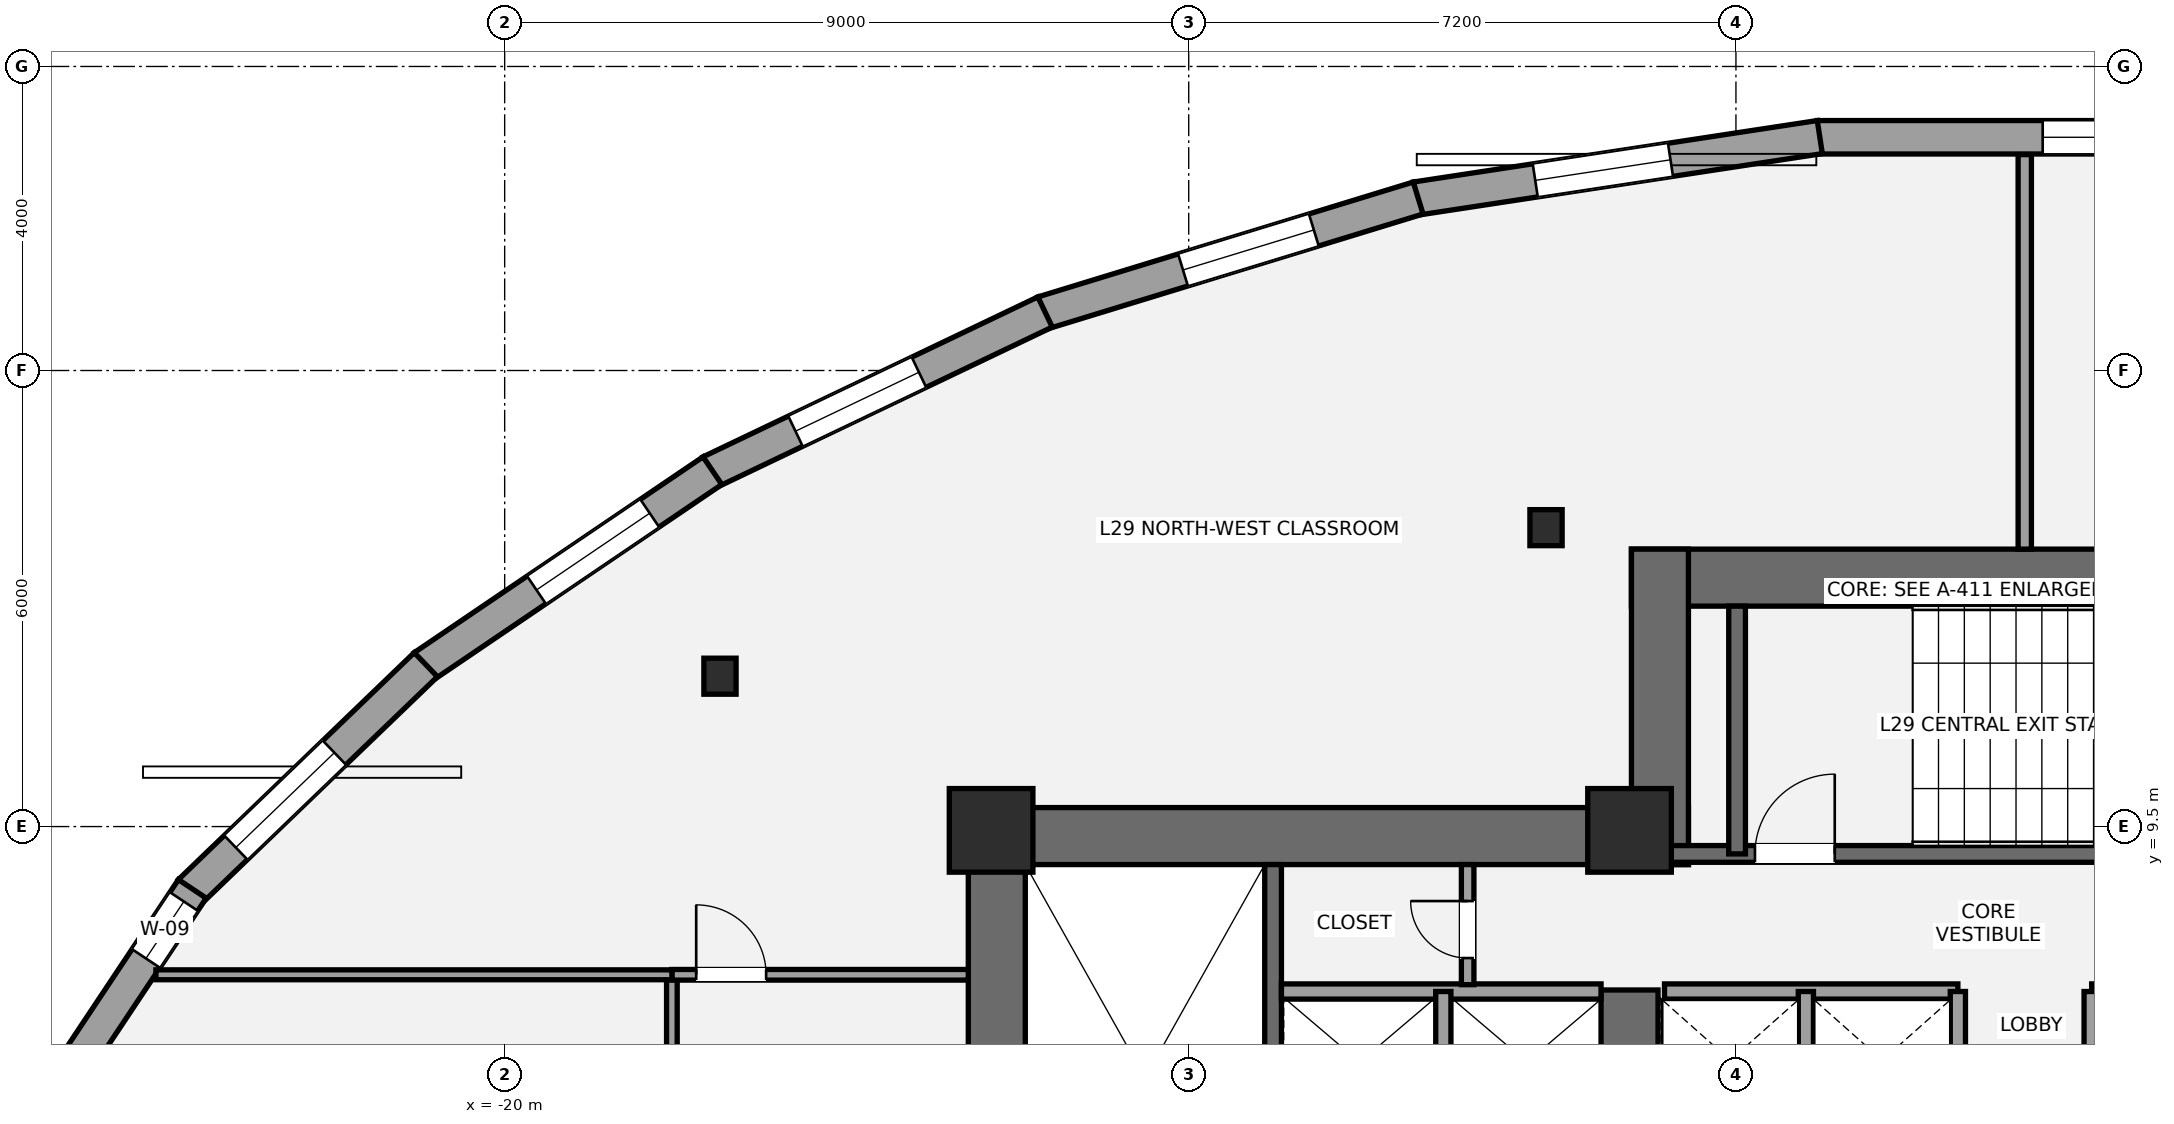
"""IFC4 building model, lengths in metres.
Left out: names, types, materials, properties, quantities, classifications, styles, units other than length and angle.
Written with IfcOpenShell. Run it as: python <this file> out.ifc"""

import sys

from ifc_helpers import new_model, si_unit, direction, frame, frame_2d, origin, origin_2d, place, context, subcontext, project, spatial, rectangle, i_section, extrude, element, fill, save


model = new_model("IFC4")
c1 = context("Model", 3, precision=1e-05, world=origin(), true_north=direction((0.0, 1.0)))
c2 = subcontext(c1, "Body", "Model", "MODEL_VIEW")
j1 = project(units=[si_unit("LENGTHUNIT", "METRE"), si_unit("PLANEANGLEUNIT", "RADIAN")], contexts=[c1])
p1 = place(None, origin())
s1 = spatial("IfcSite", under=j1, at=p1, CompositionType="ELEMENT")
p2 = place(p1, origin())
s2 = spatial("IfcBuilding", under=s1, at=p2, CompositionType="ELEMENT")
p3 = place(p2, frame((0.0, 0.0, 110.6)))
s3 = spatial("IfcBuildingStorey", under=s2, at=p3, CompositionType="ELEMENT", Elevation=110.6)
p4 = place(p3, frame((-13.525, 1.1, 0.0), z_axis=(0.0, 0.0, 1.0), x_axis=(0.0, 1.0, 0.0)))
e1 = element("IfcWall", 1, at=p4, inside=s3, PredefinedType="SHEAR", context=c2, shape_type="SweptSolid", body=[
    extrude(rectangle(XDim=8.65, YDim=0.75, at=frame_2d((4.325, 0.0))), origin(), (0.0, 0.0, 1.0), 3.5),
])
p5 = place(p3, frame((-13.9, 9.375, 0.0), z_axis=(0.0, 0.0, 1.0), x_axis=(1.0, 0.0, 0.0)))
e2 = element("IfcWall", 2, at=p5, inside=s3, PredefinedType="SHEAR", context=c2, shape_type="SweptSolid", body=[
    extrude(rectangle(XDim=9.475, YDim=0.75, at=frame_2d((4.737, 0.0))), origin(), (0.0, 0.0, 1.0), 3.5),
])
p6 = place(p3, frame((-5.2, 5.35, 0.0), z_axis=(0.0, 0.0, 1.0), x_axis=(0.0, 1.0, 0.0)))
e3 = element("IfcWall", 3, at=p6, inside=s3, PredefinedType="SHEAR", context=c2, shape_type="SweptSolid", body=[
    extrude(rectangle(XDim=2.0, YDim=0.75, at=frame_2d((1.0, 0.0))), origin(), (0.0, 0.0, 1.0), 3.5),
])
p7 = place(p3, frame((-9.89, 1.85, 0.0), z_axis=(0.0, 0.0, 1.0), x_axis=(0.0, 1.0, 0.0)))
e4 = element("IfcWall", 4, at=p7, inside=s3, PredefinedType="SHEAR", context=c2, shape_type="SweptSolid", body=[
    extrude(rectangle(XDim=7.15, YDim=0.22, at=frame_2d((3.575, 0.0))), origin(), (0.0, 0.0, 1.0), 3.5),
])
p8 = place(p3, frame((-5.175, 12.775, 0.0), z_axis=(0.0, 0.0, 1.0), x_axis=(1.0, 0.0, 0.0)))
e5 = element("IfcWall", 5, at=p8, inside=s3, PredefinedType="SHEAR", context=c2, shape_type="SweptSolid", body=[
    extrude(rectangle(XDim=10.35, YDim=0.75, at=frame_2d((5.175, 0.0))), origin(), (0.0, 0.0, 1.0), 3.5),
])
p9 = place(p3, frame((-4.8, 9.0, 0.0), z_axis=(0.0, 0.0, 1.0), x_axis=(0.0, 1.0, 0.0)))
e6 = element("IfcWall", 6, at=p9, inside=s3, PredefinedType="SHEAR", context=c2, shape_type="SweptSolid", body=[
    extrude(rectangle(XDim=4.15, YDim=0.75, at=frame_2d((2.075, 0.0))), origin(), (0.0, 0.0, 1.0), 3.5),
])
p10 = place(p3, frame((-4.7, 9.14, 0.0), z_axis=(0.0, 0.0, 1.0), x_axis=(1.0, 0.0, 0.0)))
e7 = element("IfcWall", 7, at=p10, inside=s3, PredefinedType="SHEAR", context=c2, shape_type="SweptSolid", body=[
    extrude(rectangle(XDim=9.3, YDim=0.22, at=frame_2d((4.65, 0.0))), origin(), (0.0, 0.0, 1.0), 3.5),
])
p11 = place(p10, frame((1.15, 0.0, 0.0)))
e8 = element("IfcOpeningElement", 8, at=p11, cuts=e7, PredefinedType="OPENING", context=c2, shape_type="SweptSolid", body=[
    extrude(rectangle(XDim=1.05, YDim=2.15, at=frame_2d((0.525, 1.075))), frame((0.0, 0.12, 0.0), z_axis=(0.0, -1.0, 0.0), x_axis=(1.0, 0.0, 0.0)), (0.0, 0.0, 1.0), 0.24),
])
p12 = place(p3, frame((-3.785, 9.14, 0.0), z_axis=(0.0, 0.0, 1.0), x_axis=(0.0, 1.0, 0.0)))
e9 = element("IfcWall", 9, at=p12, inside=s3, PredefinedType="SHEAR", context=c2, shape_type="SweptSolid", body=[
    extrude(rectangle(XDim=3.26, YDim=0.22, at=frame_2d((1.63, 0.0))), origin(), (0.0, 0.0, 1.0), 3.5),
])
for number, where, z_axis, x_axis in (
    (10, (-13.6, 9.45, 0.0), (0.0, 0.0, 1.0), (1.0, 0.0, 0.0)),
    (11, (-5.2, 9.45, 0.0), (0.0, 0.0, 1.0), (1.0, 0.0, 0.0)),
):
    element("IfcColumn", number, at=place(p3, frame(where, z_axis=z_axis, x_axis=x_axis)), inside=s3, PredefinedType="COLUMN", context=c2, shape_type="SweptSolid", body=[
        extrude(rectangle(XDim=1.1, YDim=1.1, at=origin_2d()), origin(), (0.0, 0.0, 1.0), 3.5),
    ])
for number, where, z_axis, x_axis in (
    (12, (-6.299, 13.433, 0.0), (0.0, 0.0, 1.0), (1.0, 0.0, 0.0)),
    (13, (-17.167, 11.478, 0.0), (0.0, 0.0, 1.0), (1.0, 0.0, 0.0)),
):
    element("IfcColumn", number, at=place(p3, frame(where, z_axis=z_axis, x_axis=x_axis)), inside=s3, PredefinedType="COLUMN", context=c2, shape_type="SweptSolid", body=[
        extrude(i_section(OverallWidth=0.424, OverallDepth=0.474, WebThickness=0.048, FlangeThickness=0.077, at=origin_2d()), origin(), (0.0, 0.0, 1.0), 3.5),
    ])
p13 = place(p3, frame((-2.73, 18.568, 0.0), z_axis=(0.0, 0.0, 1.0), x_axis=(1.0, 0.0, 0.0)))
e14 = element("IfcWall", 14, at=p13, inside=s3, PredefinedType="STANDARD", context=c2, shape_type="SweptSolid", body=[
    extrude(rectangle(XDim=5.459, YDim=0.44, at=frame_2d((2.73, 0.0))), origin(), (0.0, 0.0, 1.0), 2.528),
])
p14 = place(p13, frame((2.966, 0.0, 0.65)))
e15 = element("IfcOpeningElement", 15, at=p14, cuts=e14, PredefinedType="OPENING", context=c2, shape_type="SweptSolid", body=[
    extrude(rectangle(XDim=1.8, YDim=1.7, at=frame_2d((0.9, 0.85))), frame((0.0, 0.23, 0.0), z_axis=(0.0, -1.0, 0.0), x_axis=(1.0, 0.0, 0.0)), (0.0, 0.0, 1.0), 0.46),
])
p15 = place(p3, frame((-8.012, 17.762, 0.0), z_axis=(0.0, 0.0, 1.0), x_axis=(0.988627497469, 0.150385076545, 0.0)))
e16 = element("IfcWall", 16, at=p15, inside=s3, PredefinedType="STANDARD", context=c2, shape_type="SweptSolid", body=[
    extrude(rectangle(XDim=5.377, YDim=0.44, at=frame_2d((2.688, 0.0))), origin(), (0.0, 0.0, 1.0), 2.528),
])
p16 = place(p15, frame((1.59, 0.0, 0.65)))
e17 = element("IfcOpeningElement", 17, at=p16, cuts=e16, PredefinedType="OPENING", context=c2, shape_type="SweptSolid", body=[
    extrude(rectangle(XDim=1.8, YDim=1.7, at=frame_2d((0.9, 0.85))), frame((0.0, 0.23, 0.0), z_axis=(0.0, -1.0, 0.0), x_axis=(1.0, 0.0, 0.0)), (0.0, 0.0, 1.0), 0.46),
])
p17 = place(p3, frame((-12.92, 16.258, 0.0), z_axis=(0.0, 0.0, 1.0), x_axis=(0.956228569431, 0.292620783617, 0.0)))
e18 = element("IfcWall", 18, at=p17, inside=s3, PredefinedType="STANDARD", context=c2, shape_type="SweptSolid", body=[
    extrude(rectangle(XDim=5.165, YDim=0.44, at=frame_2d((2.583, 0.0))), origin(), (0.0, 0.0, 1.0), 2.528),
])
p18 = place(p17, frame((1.93, 0.0, 0.65)))
e19 = element("IfcOpeningElement", 19, at=p18, cuts=e18, PredefinedType="OPENING", context=c2, shape_type="SweptSolid", body=[
    extrude(rectangle(XDim=1.8, YDim=1.7, at=frame_2d((0.9, 0.85))), frame((0.0, 0.23, 0.0), z_axis=(0.0, -1.0, 0.0), x_axis=(1.0, 0.0, 0.0)), (0.0, 0.0, 1.0), 0.46),
])
p19 = place(p3, frame((-17.295, 14.166, 0.0), z_axis=(0.0, 0.0, 1.0), x_axis=(0.902372757907, 0.430956385018, 0.0)))
e20 = element("IfcWall", 20, at=p19, inside=s3, PredefinedType="STANDARD", context=c2, shape_type="SweptSolid", body=[
    extrude(rectangle(XDim=4.882, YDim=0.44, at=frame_2d((2.441, 0.0))), origin(), (0.0, 0.0, 1.0), 2.528),
])
p20 = place(p19, frame((1.243, 0.0, 0.65)))
e21 = element("IfcOpeningElement", 21, at=p20, cuts=e20, PredefinedType="OPENING", context=c2, shape_type="SweptSolid", body=[
    extrude(rectangle(XDim=1.8, YDim=1.7, at=frame_2d((0.9, 0.85))), frame((0.0, 0.23, 0.0), z_axis=(0.0, -1.0, 0.0), x_axis=(1.0, 0.0, 0.0)), (0.0, 0.0, 1.0), 0.46),
])
p21 = place(p3, frame((-21.066, 11.606, 0.0), z_axis=(0.0, 0.0, 1.0), x_axis=(0.827754551165, 0.56109036975, 0.0)))
e22 = element("IfcWall", 22, at=p21, inside=s3, PredefinedType="STANDARD", context=c2, shape_type="SweptSolid", body=[
    extrude(rectangle(XDim=4.591, YDim=0.44, at=frame_2d((2.295, 0.0))), origin(), (0.0, 0.0, 1.0), 2.528),
])
p22 = place(p21, frame((1.794, 0.0, 0.65)))
e23 = element("IfcOpeningElement", 23, at=p22, cuts=e22, PredefinedType="OPENING", context=c2, shape_type="SweptSolid", body=[
    extrude(rectangle(XDim=1.8, YDim=1.7, at=frame_2d((0.9, 0.85))), frame((0.0, 0.23, 0.0), z_axis=(0.0, -1.0, 0.0), x_axis=(1.0, 0.0, 0.0)), (0.0, 0.0, 1.0), 0.46),
])
p23 = place(p3, frame((-24.14, 8.644, 0.0), z_axis=(0.0, 0.0, 1.0), x_axis=(0.720581378362, 0.693370375166, 0.0)))
e24 = element("IfcWall", 24, at=p23, inside=s3, PredefinedType="STANDARD", context=c2, shape_type="SweptSolid", body=[
    extrude(rectangle(XDim=4.307, YDim=0.44, at=frame_2d((2.153, 0.0))), origin(), (0.0, 0.0, 1.0), 2.528),
])
p24 = place(p23, frame((0.837, 0.0, 0.65)))
e25 = element("IfcOpeningElement", 25, at=p24, cuts=e24, PredefinedType="OPENING", context=c2, shape_type="SweptSolid", body=[
    extrude(rectangle(XDim=1.8, YDim=1.7, at=frame_2d((0.9, 0.85))), frame((0.0, 0.23, 0.0), z_axis=(0.0, -1.0, 0.0), x_axis=(1.0, 0.0, 0.0)), (0.0, 0.0, 1.0), 0.46),
])
p25 = place(p3, frame((-26.34, 5.332, 0.0), z_axis=(0.0, 0.0, 1.0), x_axis=(0.554293965046, 0.83232097193, 0.0)))
e26 = element("IfcWall", 26, at=p25, inside=s3, PredefinedType="STANDARD", context=c2, shape_type="SweptSolid", body=[
    extrude(rectangle(XDim=4.023, YDim=0.44, at=frame_2d((2.011, 0.0))), origin(), (0.0, 0.0, 1.0), 2.528),
])
p26 = place(p25, frame((2.923, 0.0, 0.58)))
e27 = element("IfcOpeningElement", 27, at=p26, cuts=e26, PredefinedType="OPENING", context=c2, shape_type="SweptSolid", body=[
    extrude(rectangle(XDim=0.9, YDim=1.35, at=frame_2d((0.45, 0.675))), frame((0.0, 0.23, 0.0), z_axis=(0.0, -1.0, 0.0), x_axis=(1.0, 0.0, 0.0)), (0.0, 0.0, 1.0), 0.46),
])
p27 = place(p3, frame((-9.78, 7.33, 0.0), z_axis=(0.0, 0.0, 1.0), x_axis=(1.0, 0.0, 0.0)))
e28 = element("IfcWall", 28, at=p27, inside=s3, PredefinedType="SOLIDWALL", context=c2, shape_type="SweptSolid", body=[
    extrude(rectangle(XDim=4.205, YDim=0.2, at=frame_2d((2.103, 0.0))), origin(), (0.0, 0.0, 1.0), 3.31),
])
p28 = place(p3, frame((-7.65, 5.47, 0.0), z_axis=(0.0, 0.0, 1.0), x_axis=(0.0, 1.0, 0.0)))
e29 = element("IfcWall", 29, at=p28, inside=s3, PredefinedType="SOLIDWALL", context=c2, shape_type="SweptSolid", body=[
    extrude(rectangle(XDim=1.86, YDim=0.2, at=frame_2d((0.93, 0.0))), origin(), (0.0, 0.0, 1.0), 3.31),
])
for number, where, z_axis, x_axis in (
    (30, (-4.74, 7.33, 0.0), (0.0, 0.0, 1.0), (1.0, 0.0, 0.0)),
    (31, (0.88, 7.33, 0.0), (0.0, 0.0, 1.0), (1.0, 0.0, 0.0)),
):
    element("IfcWall", number, at=place(p3, frame(where, z_axis=z_axis, x_axis=x_axis)), inside=s3, PredefinedType="SOLIDWALL", context=c2, shape_type="SweptSolid", body=[
        extrude(rectangle(XDim=3.86, YDim=0.2, at=frame_2d((1.93, 0.0))), origin(), (0.0, 0.0, 1.0), 3.31),
    ])
for number, where, z_axis, x_axis in (
    (32, (-2.88, 5.52, 0.0), (0.0, 0.0, 1.0), (0.0, 1.0, 0.0)),
    (33, (-0.88, 5.52, 0.0), (0.0, 0.0, 1.0), (0.0, 1.0, 0.0)),
    (34, (0.88, 5.52, 0.0), (0.0, 0.0, 1.0), (0.0, 1.0, 0.0)),
):
    element("IfcWall", number, at=place(p3, frame(where, z_axis=z_axis, x_axis=x_axis)), inside=s3, PredefinedType="SOLIDWALL", context=c2, shape_type="SweptSolid", body=[
        extrude(rectangle(XDim=1.81, YDim=0.2, at=frame_2d((0.905, 0.0))), origin(), (0.0, 0.0, 1.0), 3.31),
    ])
p29 = place(p3, frame((-7.33, 7.42, 0.0), z_axis=(0.0, 0.0, 1.0), x_axis=(0.0, 1.0, 0.0)))
e35 = element("IfcWall", 35, at=p29, inside=s3, PredefinedType="PARTITIONING", context=c2, shape_type="SweptSolid", body=[
    extrude(rectangle(XDim=1.58, YDim=0.165, at=frame_2d((0.79, 0.0))), origin(), (0.0, 0.0, 1.0), 3.31),
])
p30 = place(p29, frame((0.35, 0.0, 0.0)))
e36 = element("IfcOpeningElement", 36, at=p30, cuts=e35, PredefinedType="OPENING", context=c2, shape_type="SweptSolid", body=[
    extrude(rectangle(XDim=0.75, YDim=2.1, at=frame_2d((0.375, 1.05))), frame((0.0, 0.093, 0.0), z_axis=(0.0, -1.0, 0.0), x_axis=(1.0, 0.0, 0.0)), (0.0, 0.0, 1.0), 0.185),
])
p31 = place(p3, frame((-17.8, -13.545, 0.0), z_axis=(0.0, 0.0, 1.0), x_axis=(0.0, 1.0, 0.0)))
e37 = element("IfcWall", 37, at=p31, inside=s3, PredefinedType="PARTITIONING", context=c2, shape_type="SweptSolid", body=[
    extrude(rectangle(XDim=21.095, YDim=0.14, at=frame_2d((10.547, 0.0))), origin(), (0.0, 0.0, 1.0), 2.688),
])
p32 = place(p31, frame((9.545, 0.0, 0.0)))
e38 = element("IfcOpeningElement", 38, at=p32, cuts=e37, PredefinedType="OPENING", context=c2, shape_type="SweptSolid", body=[
    extrude(rectangle(XDim=0.9, YDim=2.1, at=frame_2d((0.45, 1.05))), frame((0.0, 0.08, 0.0), z_axis=(0.0, -1.0, 0.0), x_axis=(1.0, 0.0, 0.0)), (0.0, 0.0, 1.0), 0.16),
])
p33 = place(p31, frame((13.995, 0.0, 0.0)))
e39 = element("IfcOpeningElement", 39, at=p33, cuts=e37, PredefinedType="OPENING", context=c2, shape_type="SweptSolid", body=[
    extrude(rectangle(XDim=0.9, YDim=2.1, at=frame_2d((0.45, 1.05))), frame((0.0, 0.08, 0.0), z_axis=(0.0, -1.0, 0.0), x_axis=(1.0, 0.0, 0.0)), (0.0, 0.0, 1.0), 0.16),
])
p34 = place(p31, frame((18.469, 0.0, 0.0)))
e40 = element("IfcOpeningElement", 40, at=p34, cuts=e37, PredefinedType="OPENING", context=c2, shape_type="SweptSolid", body=[
    extrude(rectangle(XDim=0.9, YDim=2.1, at=frame_2d((0.45, 1.05))), frame((0.0, 0.08, 0.0), z_axis=(0.0, -1.0, 0.0), x_axis=(1.0, 0.0, 0.0)), (0.0, 0.0, 1.0), 0.16),
])
p35 = place(p3, frame((-17.8, 7.55, 0.0), z_axis=(0.0, 0.0, 1.0), x_axis=(1.0, 0.0, 0.0)))
e41 = element("IfcWall", 41, at=p35, inside=s3, PredefinedType="PARTITIONING", context=c2, shape_type="SweptSolid", body=[
    extrude(rectangle(XDim=3.9, YDim=0.14, at=frame_2d((1.95, 0.0))), origin(), (0.0, 0.0, 1.0), 2.763),
])
p36 = place(p35, frame((0.32, 0.0, 0.0)))
e42 = element("IfcOpeningElement", 42, at=p36, cuts=e41, PredefinedType="OPENING", context=c2, shape_type="SweptSolid", body=[
    extrude(rectangle(XDim=0.92, YDim=2.15, at=frame_2d((0.46, 1.075))), frame((0.0, 0.08, 0.0), z_axis=(0.0, -1.0, 0.0), x_axis=(1.0, 0.0, 0.0)), (0.0, 0.0, 1.0), 0.16),
])
p37 = place(p3, frame((0.0, 13.15, 0.0), z_axis=(0.0, 0.0, 1.0), x_axis=(0.0, 1.0, 0.0)))
e43 = element("IfcWall", 43, at=p37, inside=s3, PredefinedType="PARTITIONING", context=c2, shape_type="SweptSolid", body=[
    extrude(rectangle(XDim=5.19, YDim=0.175, at=frame_2d((2.595, 0.0))), origin(), (0.0, 0.0, 1.0), 2.763),
])
p38 = place(p3, frame((-24.589, 7.55, 0.0), z_axis=(0.0, 0.0, 1.0), x_axis=(1.0, 0.0, 0.0)))
e44 = element("IfcWall", 44, at=p38, inside=s3, PredefinedType="PARTITIONING", context=c2, shape_type="SweptSolid", body=[
    extrude(rectangle(XDim=6.789, YDim=0.13, at=frame_2d((3.394, 0.0))), origin(), (0.0, 0.0, 1.0), 3.31),
])
p39 = place(p14, origin())
e45 = element("IfcWindow", 45, at=p39, inside=s3, PartitioningType="SINGLE_PANEL", PredefinedType="WINDOW", context=c2, shape_type="SweptSolid", body=[
    extrude(rectangle(XDim=1.8, YDim=1.7, at=frame_2d((0.9, 0.85))), frame((0.0, -0.01, 0.0), z_axis=(0.0, -1.0, 0.0), x_axis=(1.0, 0.0, 0.0)), (0.0, 0.0, 1.0), 0.06),
])
fill(e15, e45)
p40 = place(p16, origin())
e46 = element("IfcWindow", 46, at=p40, inside=s3, PartitioningType="SINGLE_PANEL", PredefinedType="WINDOW", context=c2, shape_type="SweptSolid", body=[
    extrude(rectangle(XDim=1.8, YDim=1.7, at=frame_2d((0.9, 0.85))), frame((0.0, -0.01, 0.0), z_axis=(0.0, -1.0, 0.0), x_axis=(1.0, 0.0, 0.0)), (0.0, 0.0, 1.0), 0.06),
])
fill(e17, e46)
p41 = place(p18, origin())
e47 = element("IfcWindow", 47, at=p41, inside=s3, PartitioningType="SINGLE_PANEL", PredefinedType="WINDOW", context=c2, shape_type="SweptSolid", body=[
    extrude(rectangle(XDim=1.8, YDim=1.7, at=frame_2d((0.9, 0.85))), frame((0.0, -0.01, 0.0), z_axis=(0.0, -1.0, 0.0), x_axis=(1.0, 0.0, 0.0)), (0.0, 0.0, 1.0), 0.06),
])
fill(e19, e47)
p42 = place(p20, origin())
e48 = element("IfcWindow", 48, at=p42, inside=s3, PartitioningType="SINGLE_PANEL", PredefinedType="WINDOW", context=c2, shape_type="SweptSolid", body=[
    extrude(rectangle(XDim=1.8, YDim=1.7, at=frame_2d((0.9, 0.85))), frame((0.0, -0.01, 0.0), z_axis=(0.0, -1.0, 0.0), x_axis=(1.0, 0.0, 0.0)), (0.0, 0.0, 1.0), 0.06),
])
fill(e21, e48)
p43 = place(p22, origin())
e49 = element("IfcWindow", 49, at=p43, inside=s3, PartitioningType="SINGLE_PANEL", PredefinedType="WINDOW", context=c2, shape_type="SweptSolid", body=[
    extrude(rectangle(XDim=1.8, YDim=1.7, at=frame_2d((0.9, 0.85))), frame((0.0, -0.01, 0.0), z_axis=(0.0, -1.0, 0.0), x_axis=(1.0, 0.0, 0.0)), (0.0, 0.0, 1.0), 0.06),
])
fill(e23, e49)
p44 = place(p24, origin())
e50 = element("IfcWindow", 50, at=p44, inside=s3, PartitioningType="SINGLE_PANEL", PredefinedType="WINDOW", context=c2, shape_type="SweptSolid", body=[
    extrude(rectangle(XDim=1.8, YDim=1.7, at=frame_2d((0.9, 0.85))), frame((0.0, -0.01, 0.0), z_axis=(0.0, -1.0, 0.0), x_axis=(1.0, 0.0, 0.0)), (0.0, 0.0, 1.0), 0.06),
])
fill(e25, e50)
p45 = place(p26, origin())
e51 = element("IfcWindow", 51, at=p45, inside=s3, PartitioningType="SINGLE_PANEL", PredefinedType="WINDOW", context=c2, shape_type="SweptSolid", body=[
    extrude(rectangle(XDim=0.9, YDim=1.35, at=frame_2d((0.45, 0.675))), frame((0.0, -0.01, 0.0), z_axis=(0.0, -1.0, 0.0), x_axis=(1.0, 0.0, 0.0)), (0.0, 0.0, 1.0), 0.06),
])
fill(e27, e51)
p46 = place(p11, origin())
e52 = element("IfcDoor", 52, at=p46, inside=s3, OperationType="SINGLE_SWING_RIGHT", PredefinedType="DOOR", context=c2, shape_type="SweptSolid", body=[
    extrude(rectangle(XDim=1.05, YDim=2.15, at=frame_2d((0.525, 1.075))), frame((0.0, 0.025, 0.0), z_axis=(0.0, -1.0, 0.0), x_axis=(1.0, 0.0, 0.0)), (0.0, 0.0, 1.0), 0.05),
])
fill(e8, e52)
p47 = place(p30, origin())
e53 = element("IfcDoor", 53, at=p47, inside=s3, OperationType="SINGLE_SWING_RIGHT", PredefinedType="DOOR", context=c2, shape_type="SweptSolid", body=[
    extrude(rectangle(XDim=0.75, YDim=2.1, at=frame_2d((0.375, 1.05))), frame((0.0, 0.025, 0.0), z_axis=(0.0, -1.0, 0.0), x_axis=(1.0, 0.0, 0.0)), (0.0, 0.0, 1.0), 0.05),
])
fill(e36, e53)
p48 = place(p36, origin())
e54 = element("IfcDoor", 54, at=p48, inside=s3, OperationType="SINGLE_SWING_LEFT", PredefinedType="DOOR", context=c2, shape_type="SweptSolid", body=[
    extrude(rectangle(XDim=0.92, YDim=2.15, at=frame_2d((0.46, 1.075))), frame((0.0, 0.025, 0.0), z_axis=(0.0, -1.0, 0.0), x_axis=(1.0, 0.0, 0.0)), (0.0, 0.0, 1.0), 0.05),
])
fill(e42, e54)
save(model, sys.argv[1])
